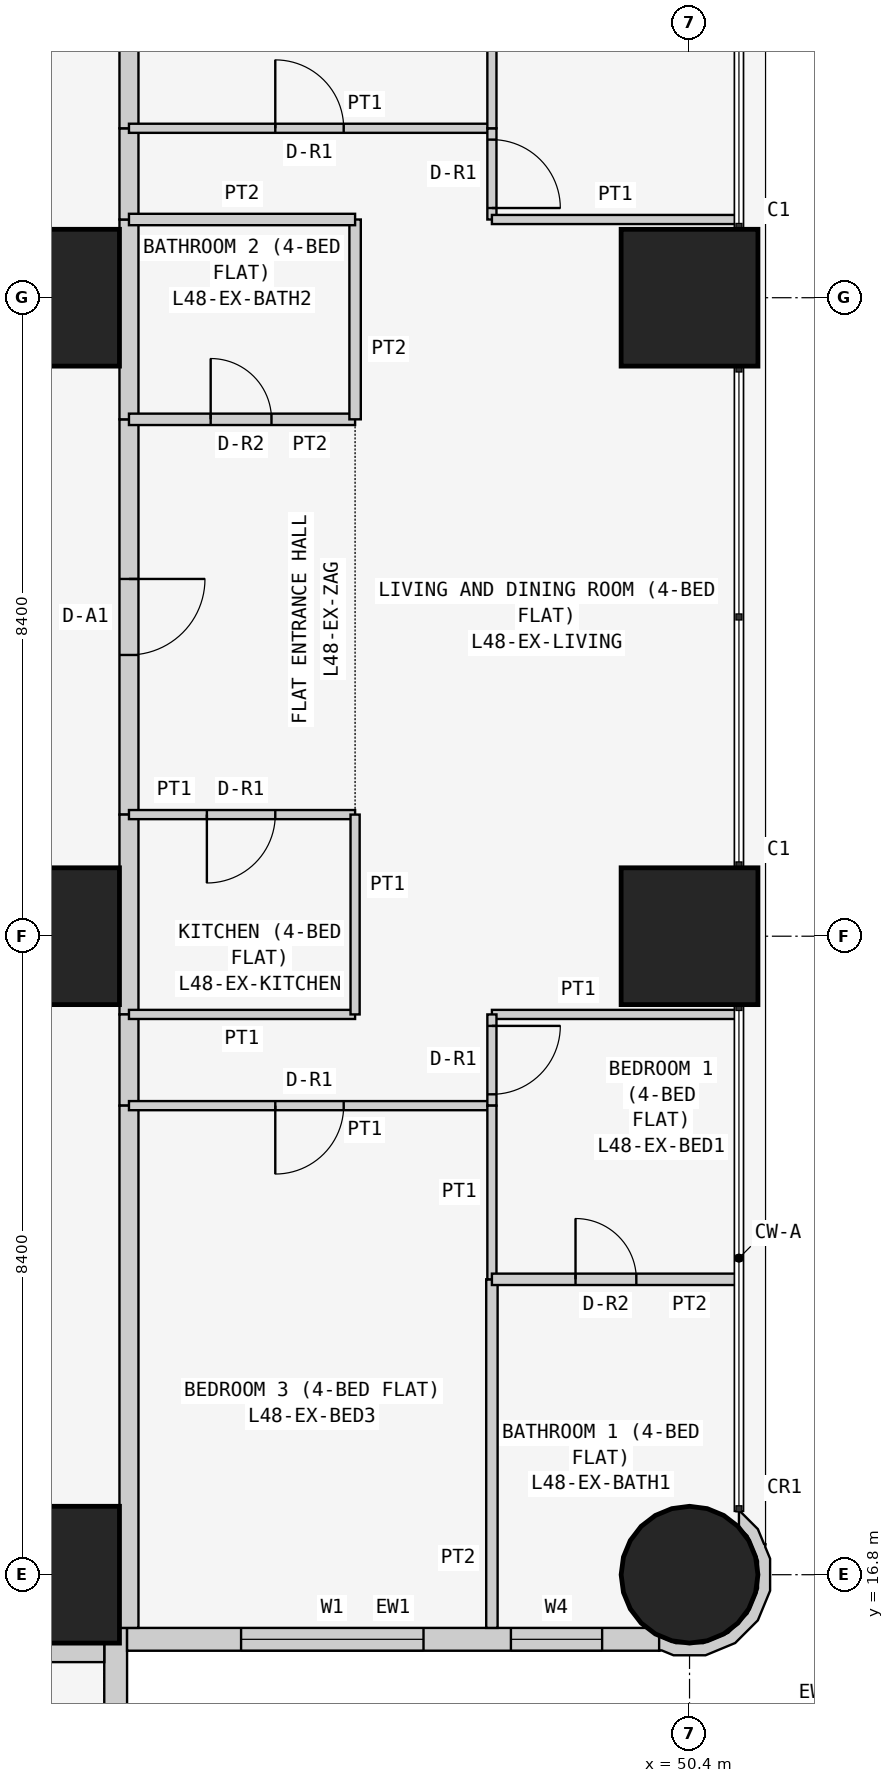
"""IFC4 building model, lengths in metres.
Left out: names, types, materials, properties, quantities, classifications, styles, units other than length and angle.
Written with IfcOpenShell. Run it as: python <this file> out.ifc"""

import sys

from ifc_helpers import new_model, si_unit, direction, frame, frame_2d, origin, origin_2d, place, context, subcontext, project, spatial, polyline, rectangle, circle, outline, extrude, element, fill, save


model = new_model("IFC4")
c1 = context("Model", 3, precision=1e-05, world=origin(), true_north=direction((0.0, 1.0)))
c2 = subcontext(c1, "Body", "Model", "MODEL_VIEW")
j1 = project(units=[si_unit("LENGTHUNIT", "METRE"), si_unit("PLANEANGLEUNIT", "RADIAN")], contexts=[c1])
p1 = place(None, origin())
s1 = spatial("IfcSite", under=j1, at=p1, CompositionType="ELEMENT")
p2 = place(p1, origin())
s2 = spatial("IfcBuilding", under=s1, at=p2, CompositionType="ELEMENT")
p3 = place(p2, frame((0.0, 0.0, 186.9)))
s3 = spatial("IfcBuildingStorey", under=s2, at=p3, CompositionType="ELEMENT", Elevation=186.9)
for number, where, z_axis, x_axis in (
    (1, (42.0, 16.8, 0.0), (0.0, 0.0, 1.0), (1.0, 0.0, 0.0)),
    (2, (42.0, 25.2, 0.0), (0.0, 0.0, 1.0), (1.0, 0.0, 0.0)),
    (3, (42.0, 33.6, 0.0), (0.0, 0.0, 1.0), (1.0, 0.0, 0.0)),
):
    element("IfcColumn", number, at=place(p3, frame(where, z_axis=z_axis, x_axis=x_axis)), inside=s3, PredefinedType="COLUMN", context=c2, shape_type="SweptSolid", body=[
        extrude(rectangle(XDim=1.8, YDim=1.8, at=origin_2d()), origin(), (0.0, 0.0, 1.0), 3.6),
    ])
p4 = place(p3, frame((50.4, 16.8, 0.0), z_axis=(0.0, 0.0, 1.0), x_axis=(1.0, 0.0, 0.0)))
e4 = element("IfcColumn", 4, at=p4, inside=s3, PredefinedType="COLUMN", context=c2, shape_type="SweptSolid", body=[
    extrude(circle(Radius=0.9, at=origin_2d()), origin(), (0.0, 0.0, 1.0), 3.6),
])
for number, where, z_axis, x_axis in (
    (5, (50.4, 25.2, 0.0), (0.0, 0.0, 1.0), (1.0, 0.0, 0.0)),
    (6, (50.4, 33.6, 0.0), (0.0, 0.0, 1.0), (1.0, 0.0, 0.0)),
):
    element("IfcColumn", number, at=place(p3, frame(where, z_axis=z_axis, x_axis=x_axis)), inside=s3, PredefinedType="COLUMN", context=c2, shape_type="SweptSolid", body=[
        extrude(rectangle(XDim=1.8, YDim=1.8, at=origin_2d()), origin(), (0.0, 0.0, 1.0), 3.6),
    ])
p5 = place(p3, frame((42.85, 8.8, 0.0), z_axis=(0.0, 0.0, 1.0), x_axis=(0.0, 1.0, 0.0)))
e7 = element("IfcWall", 7, at=p5, inside=s3, PredefinedType="SOLIDWALL", context=c2, shape_type="SweptSolid", body=[
    extrude(rectangle(XDim=7.3, YDim=0.3, at=frame_2d((3.65, 0.0))), origin(), (0.0, 0.0, 1.0), 3.45),
])
p6 = place(p5, frame((3.1, 0.0, 0.9)))
e8 = element("IfcOpeningElement", 8, at=p6, cuts=e7, PredefinedType="OPENING", context=c2, shape_type="SweptSolid", body=[
    extrude(rectangle(XDim=2.4, YDim=1.5, at=frame_2d((1.2, 0.75))), frame((0.0, 0.16, 0.0), z_axis=(0.0, -1.0, 0.0), x_axis=(1.0, 0.0, 0.0)), (0.0, 0.0, 1.0), 0.32),
])
p7 = place(p5, frame((0.75, 0.0, 0.9)))
e9 = element("IfcOpeningElement", 9, at=p7, cuts=e7, PredefinedType="OPENING", context=c2, shape_type="SweptSolid", body=[
    extrude(rectangle(XDim=1.2, YDim=1.5, at=frame_2d((0.6, 0.75))), frame((0.0, 0.16, 0.0), z_axis=(0.0, -1.0, 0.0), x_axis=(1.0, 0.0, 0.0)), (0.0, 0.0, 1.0), 0.32),
])
p8 = place(p3, frame((43.0, 15.95, 0.0), z_axis=(0.0, 0.0, 1.0), x_axis=(1.0, 0.0, 0.0)))
e10 = element("IfcWall", 10, at=p8, inside=s3, PredefinedType="SOLIDWALL", context=c2, shape_type="SweptSolid", body=[
    extrude(rectangle(XDim=7.0, YDim=0.3, at=frame_2d((3.5, 0.0))), origin(), (0.0, 0.0, 1.0), 3.45),
])
p9 = place(p8, frame((1.5, 0.0, 0.9)))
e11 = element("IfcOpeningElement", 11, at=p9, cuts=e10, PredefinedType="OPENING", context=c2, shape_type="SweptSolid", body=[
    extrude(rectangle(XDim=2.4, YDim=1.5, at=frame_2d((1.2, 0.75))), frame((0.0, 0.16, 0.0), z_axis=(0.0, -1.0, 0.0), x_axis=(1.0, 0.0, 0.0)), (0.0, 0.0, 1.0), 0.32),
])
p10 = place(p8, frame((5.05, 0.0, 0.9)))
e12 = element("IfcOpeningElement", 12, at=p10, cuts=e10, PredefinedType="OPENING", context=c2, shape_type="SweptSolid", body=[
    extrude(rectangle(XDim=1.2, YDim=1.5, at=frame_2d((0.6, 0.75))), frame((0.0, 0.16, 0.0), z_axis=(0.0, -1.0, 0.0), x_axis=(1.0, 0.0, 0.0)), (0.0, 0.0, 1.0), 0.32),
])
p11 = place(p3, frame((50.036, 15.89, 0.0), z_axis=(0.0, 0.0, 1.0), x_axis=(0.926129809145, -0.377204953059, 0.0)))
e13 = element("IfcWall", 13, at=p11, inside=s3, PredefinedType="SOLIDWALL", context=c2, shape_type="SweptSolid", body=[
    extrude(outline(polyline([(0.769, 1.728), (0.75, 1.723), (0.6, 1.875), (0.295, 2.004), (0.281, 1.998), (0.36, 1.803), (0.509, 1.741), (0.761, 1.486), (0.896, 1.154), (0.894, 0.795), (0.755, 0.465), (0.5, 0.213), (0.168, 0.078), (-0.1, 0.08), (0.001, -0.097), (0.03, -0.08), (0.198, -0.081), (0.589, 0.078), (0.889, 0.374), (1.052, 0.763), (1.055, 1.184), (0.896, 1.575), (0.778, 1.695), (0.769, 1.728)])), origin(), (0.0, 0.0, 1.0), 3.45),
])
p12 = place(p3, frame((43.025, 32.0, 0.0), z_axis=(0.0, 0.0, 1.0), x_axis=(0.0, -1.0, 0.0)))
e14 = element("IfcWall", 14, at=p12, inside=s3, PredefinedType="PARTITIONING", context=c2, shape_type="SweptSolid", body=[
    extrude(rectangle(XDim=5.2, YDim=0.25, at=frame_2d((2.6, 0.0))), origin(), (0.0, 0.0, 1.0), 3.45),
])
p13 = place(p12, frame((2.1, 0.0, 0.0)))
e15 = element("IfcOpeningElement", 15, at=p13, cuts=e14, PredefinedType="OPENING", context=c2, shape_type="SweptSolid", body=[
    extrude(rectangle(XDim=1.0, YDim=2.1, at=frame_2d((0.5, 1.05))), frame((0.0, 0.135, 0.0), z_axis=(0.0, -1.0, 0.0), x_axis=(1.0, 0.0, 0.0)), (0.0, 0.0, 1.0), 0.27),
])
p14 = place(p3, frame((43.025, 34.629, 0.0), z_axis=(0.0, 0.0, 1.0), x_axis=(0.0, -1.0, 0.0)))
e16 = element("IfcWall", 16, at=p14, inside=s3, PredefinedType="PARTITIONING", context=c2, shape_type="SweptSolid", body=[
    extrude(rectangle(XDim=2.629, YDim=0.25, at=frame_2d((1.314, 0.0))), origin(), (0.0, 0.0, 1.0), 3.45),
])
p15 = place(p3, frame((43.025, 26.8, 0.0), z_axis=(0.0, 0.0, 1.0), x_axis=(0.0, -1.0, 0.0)))
e17 = element("IfcWall", 17, at=p15, inside=s3, PredefinedType="PARTITIONING", context=c2, shape_type="SweptSolid", body=[
    extrude(rectangle(XDim=2.629, YDim=0.25, at=frame_2d((1.314, 0.0))), origin(), (0.0, 0.0, 1.0), 3.45),
])
p16 = place(p3, frame((43.025, 24.171, 0.0), z_axis=(0.0, 0.0, 1.0), x_axis=(0.0, -1.0, 0.0)))
e18 = element("IfcWall", 18, at=p16, inside=s3, PredefinedType="PARTITIONING", context=c2, shape_type="SweptSolid", body=[
    extrude(rectangle(XDim=1.2, YDim=0.25, at=frame_2d((0.6, 0.0))), origin(), (0.0, 0.0, 1.0), 3.45),
])
p17 = place(p3, frame((43.025, 35.829, 0.0), z_axis=(0.0, 0.0, 1.0), x_axis=(0.0, -1.0, 0.0)))
e19 = element("IfcWall", 19, at=p17, inside=s3, PredefinedType="PARTITIONING", context=c2, shape_type="SweptSolid", body=[
    extrude(rectangle(XDim=1.2, YDim=0.25, at=frame_2d((0.6, 0.0))), origin(), (0.0, 0.0, 1.0), 3.45),
])
for number, where, z_axis, x_axis in (
    (20, (43.025, 42.7, 0.0), (0.0, 0.0, 1.0), (0.0, -1.0, 0.0)),
    (21, (43.025, 22.971, 0.0), (0.0, 0.0, 1.0), (0.0, -1.0, 0.0)),
    (22, (42.7, 15.775, 0.0), (0.0, 0.0, 1.0), (-1.0, 0.0, 0.0)),
):
    element("IfcWall", number, at=place(p3, frame(where, z_axis=z_axis, x_axis=x_axis)), inside=s3, PredefinedType="PARTITIONING", context=c2, shape_type="SweptSolid", body=[
        extrude(rectangle(XDim=6.871, YDim=0.25, at=frame_2d((3.436, 0.0))), origin(), (0.0, 0.0, 1.0), 3.45),
    ])
p18 = place(p3, frame((46.0, 32.0, 0.0), z_axis=(0.0, 0.0, 1.0), x_axis=(-1.0, 0.0, 0.0)))
e23 = element("IfcWall", 23, at=p18, inside=s3, PredefinedType="PARTITIONING", context=c2, shape_type="SweptSolid", body=[
    extrude(rectangle(XDim=2.975, YDim=0.15, at=frame_2d((1.488, 0.0))), origin(), (0.0, 0.0, 1.0), 3.45),
])
p19 = place(p18, frame((1.1, 0.0, 0.0)))
e24 = element("IfcOpeningElement", 24, at=p19, cuts=e23, PredefinedType="OPENING", context=c2, shape_type="SweptSolid", body=[
    extrude(rectangle(XDim=0.8, YDim=2.1, at=frame_2d((0.4, 1.05))), frame((0.0, 0.085, 0.0), z_axis=(0.0, -1.0, 0.0), x_axis=(1.0, 0.0, 0.0)), (0.0, 0.0, 1.0), 0.17),
])
p20 = place(p3, frame((43.025, 26.8, 0.0), z_axis=(0.0, 0.0, 1.0), x_axis=(1.0, 0.0, 0.0)))
e25 = element("IfcWall", 25, at=p20, inside=s3, PredefinedType="PARTITIONING", context=c2, shape_type="SweptSolid", body=[
    extrude(rectangle(XDim=2.975, YDim=0.12, at=frame_2d((1.488, 0.0))), origin(), (0.0, 0.0, 1.0), 3.45),
])
p21 = place(p20, frame((1.025, 0.0, 0.0)))
e26 = element("IfcOpeningElement", 26, at=p21, cuts=e25, PredefinedType="OPENING", context=c2, shape_type="SweptSolid", body=[
    extrude(rectangle(XDim=0.9, YDim=2.1, at=frame_2d((0.45, 1.05))), frame((0.0, 0.07, 0.0), z_axis=(0.0, -1.0, 0.0), x_axis=(1.0, 0.0, 0.0)), (0.0, 0.0, 1.0), 0.14),
])
p22 = place(p3, frame((46.0, 32.0, 0.0), z_axis=(0.0, 0.0, 1.0), x_axis=(0.0, 1.0, 0.0)))
e27 = element("IfcWall", 27, at=p22, inside=s3, PredefinedType="PARTITIONING", context=c2, shape_type="SweptSolid", body=[
    extrude(rectangle(XDim=2.629, YDim=0.15, at=frame_2d((1.314, 0.0))), origin(), (0.0, 0.0, 1.0), 3.45),
])
p23 = place(p3, frame((46.0, 34.629, 0.0), z_axis=(0.0, 0.0, 1.0), x_axis=(-1.0, 0.0, 0.0)))
e28 = element("IfcWall", 28, at=p23, inside=s3, PredefinedType="PARTITIONING", context=c2, shape_type="SweptSolid", body=[
    extrude(rectangle(XDim=2.975, YDim=0.15, at=frame_2d((1.488, 0.0))), origin(), (0.0, 0.0, 1.0), 3.45),
])
p24 = place(p3, frame((43.025, 24.171, 0.0), z_axis=(0.0, 0.0, 1.0), x_axis=(1.0, 0.0, 0.0)))
e29 = element("IfcWall", 29, at=p24, inside=s3, PredefinedType="PARTITIONING", context=c2, shape_type="SweptSolid", body=[
    extrude(rectangle(XDim=2.975, YDim=0.12, at=frame_2d((1.488, 0.0))), origin(), (0.0, 0.0, 1.0), 3.45),
])
p25 = place(p3, frame((46.0, 24.171, 0.0), z_axis=(0.0, 0.0, 1.0), x_axis=(0.0, 1.0, 0.0)))
e30 = element("IfcWall", 30, at=p25, inside=s3, PredefinedType="PARTITIONING", context=c2, shape_type="SweptSolid", body=[
    extrude(rectangle(XDim=2.629, YDim=0.12, at=frame_2d((1.314, 0.0))), origin(), (0.0, 0.0, 1.0), 3.45),
])
p26 = place(p3, frame((43.025, 35.829, 0.0), z_axis=(0.0, 0.0, 1.0), x_axis=(1.0, 0.0, 0.0)))
e31 = element("IfcWall", 31, at=p26, inside=s3, PredefinedType="PARTITIONING", context=c2, shape_type="SweptSolid", body=[
    extrude(rectangle(XDim=4.775, YDim=0.12, at=frame_2d((2.388, 0.0))), origin(), (0.0, 0.0, 1.0), 3.45),
])
p27 = place(p26, frame((1.925, 0.0, 0.0)))
e32 = element("IfcOpeningElement", 32, at=p27, cuts=e31, PredefinedType="OPENING", context=c2, shape_type="SweptSolid", body=[
    extrude(rectangle(XDim=0.9, YDim=2.1, at=frame_2d((0.45, 1.05))), frame((0.0, 0.07, 0.0), z_axis=(0.0, -1.0, 0.0), x_axis=(1.0, 0.0, 0.0)), (0.0, 0.0, 1.0), 0.14),
])
p28 = place(p3, frame((47.8, 35.829, 0.0), z_axis=(0.0, 0.0, 1.0), x_axis=(0.0, -1.0, 0.0)))
e33 = element("IfcWall", 33, at=p28, inside=s3, PredefinedType="PARTITIONING", context=c2, shape_type="SweptSolid", body=[
    extrude(rectangle(XDim=1.2, YDim=0.12, at=frame_2d((0.6, 0.0))), origin(), (0.0, 0.0, 1.0), 3.45),
])
p29 = place(p28, frame((0.149, 0.0, 0.0)))
e34 = element("IfcOpeningElement", 34, at=p29, cuts=e33, PredefinedType="OPENING", context=c2, shape_type="SweptSolid", body=[
    extrude(rectangle(XDim=0.9, YDim=2.1, at=frame_2d((0.45, 1.05))), frame((0.0, 0.07, 0.0), z_axis=(0.0, -1.0, 0.0), x_axis=(1.0, 0.0, 0.0)), (0.0, 0.0, 1.0), 0.14),
])
p30 = place(p3, frame((47.8, 34.629, 0.0), z_axis=(0.0, 0.0, 1.0), x_axis=(1.0, 0.0, 0.0)))
e35 = element("IfcWall", 35, at=p30, inside=s3, PredefinedType="PARTITIONING", context=c2, shape_type="SweptSolid", body=[
    extrude(rectangle(XDim=3.25, YDim=0.12, at=frame_2d((1.625, 0.0))), origin(), (0.0, 0.0, 1.0), 3.45),
])
p31 = place(p3, frame((47.8, 22.971, 0.0), z_axis=(0.0, 0.0, 1.0), x_axis=(-1.0, 0.0, 0.0)))
e36 = element("IfcWall", 36, at=p31, inside=s3, PredefinedType="PARTITIONING", context=c2, shape_type="SweptSolid", body=[
    extrude(rectangle(XDim=4.775, YDim=0.12, at=frame_2d((2.388, 0.0))), origin(), (0.0, 0.0, 1.0), 3.45),
])
p32 = place(p31, frame((1.95, 0.0, 0.0)))
e37 = element("IfcOpeningElement", 37, at=p32, cuts=e36, PredefinedType="OPENING", context=c2, shape_type="SweptSolid", body=[
    extrude(rectangle(XDim=0.9, YDim=2.1, at=frame_2d((0.45, 1.05))), frame((0.0, 0.07, 0.0), z_axis=(0.0, -1.0, 0.0), x_axis=(1.0, 0.0, 0.0)), (0.0, 0.0, 1.0), 0.14),
])
p33 = place(p3, frame((51.05, 24.171, 0.0), z_axis=(0.0, 0.0, 1.0), x_axis=(-1.0, 0.0, 0.0)))
e38 = element("IfcWall", 38, at=p33, inside=s3, PredefinedType="PARTITIONING", context=c2, shape_type="SweptSolid", body=[
    extrude(rectangle(XDim=3.25, YDim=0.12, at=frame_2d((1.625, 0.0))), origin(), (0.0, 0.0, 1.0), 3.45),
])
p34 = place(p3, frame((47.8, 24.171, 0.0), z_axis=(0.0, 0.0, 1.0), x_axis=(0.0, -1.0, 0.0)))
e39 = element("IfcWall", 39, at=p34, inside=s3, PredefinedType="PARTITIONING", context=c2, shape_type="SweptSolid", body=[
    extrude(rectangle(XDim=1.2, YDim=0.12, at=frame_2d((0.6, 0.0))), origin(), (0.0, 0.0, 1.0), 3.45),
])
p35 = place(p34, frame((0.151, 0.0, 0.0)))
e40 = element("IfcOpeningElement", 40, at=p35, cuts=e39, PredefinedType="OPENING", context=c2, shape_type="SweptSolid", body=[
    extrude(rectangle(XDim=0.9, YDim=2.1, at=frame_2d((0.45, 1.05))), frame((0.0, 0.07, 0.0), z_axis=(0.0, -1.0, 0.0), x_axis=(1.0, 0.0, 0.0)), (0.0, 0.0, 1.0), 0.14),
])
p36 = place(p3, frame((47.8, 35.829, 0.0), z_axis=(0.0, 0.0, 1.0), x_axis=(0.0, 1.0, 0.0)))
e41 = element("IfcWall", 41, at=p36, inside=s3, PredefinedType="PARTITIONING", context=c2, shape_type="SweptSolid", body=[
    extrude(rectangle(XDim=6.871, YDim=0.12, at=frame_2d((3.436, 0.0))), origin(), (0.0, 0.0, 1.0), 3.45),
])
p37 = place(p3, frame((47.8, 16.1, 0.0), z_axis=(0.0, 0.0, 1.0), x_axis=(0.0, 1.0, 0.0)))
e42 = element("IfcWall", 42, at=p37, inside=s3, PredefinedType="PARTITIONING", context=c2, shape_type="SweptSolid", body=[
    extrude(rectangle(XDim=4.586, YDim=0.15, at=frame_2d((2.293, 0.0))), origin(), (0.0, 0.0, 1.0), 3.45),
])
p38 = place(p3, frame((47.8, 20.686, 0.0), z_axis=(0.0, 0.0, 1.0), x_axis=(0.0, 1.0, 0.0)))
e43 = element("IfcWall", 43, at=p38, inside=s3, PredefinedType="PARTITIONING", context=c2, shape_type="SweptSolid", body=[
    extrude(rectangle(XDim=2.285, YDim=0.12, at=frame_2d((1.143, 0.0))), origin(), (0.0, 0.0, 1.0), 3.45),
])
p39 = place(p3, frame((51.05, 20.686, 0.0), z_axis=(0.0, 0.0, 1.0), x_axis=(-1.0, 0.0, 0.0)))
e44 = element("IfcWall", 44, at=p39, inside=s3, PredefinedType="PARTITIONING", context=c2, shape_type="SweptSolid", body=[
    extrude(rectangle(XDim=3.25, YDim=0.15, at=frame_2d((1.625, 0.0))), origin(), (0.0, 0.0, 1.0), 3.45),
])
p40 = place(p39, frame((1.35, 0.0, 0.0)))
e45 = element("IfcOpeningElement", 45, at=p40, cuts=e44, PredefinedType="OPENING", context=c2, shape_type="SweptSolid", body=[
    extrude(rectangle(XDim=0.8, YDim=2.1, at=frame_2d((0.4, 1.05))), frame((0.0, 0.085, 0.0), z_axis=(0.0, -1.0, 0.0), x_axis=(1.0, 0.0, 0.0)), (0.0, 0.0, 1.0), 0.17),
])
p41 = place(p9, origin())
e46 = element("IfcWindow", 46, at=p41, inside=s3, PartitioningType="SINGLE_PANEL", PredefinedType="WINDOW", context=c2, shape_type="SweptSolid", body=[
    extrude(rectangle(XDim=2.4, YDim=1.5, at=frame_2d((1.2, 0.75))), frame((0.0, 0.03, 0.0), z_axis=(0.0, -1.0, 0.0), x_axis=(1.0, 0.0, 0.0)), (0.0, 0.0, 1.0), 0.06),
])
fill(e11, e46)
p42 = place(p10, origin())
e47 = element("IfcWindow", 47, at=p42, inside=s3, PartitioningType="SINGLE_PANEL", PredefinedType="WINDOW", context=c2, shape_type="SweptSolid", body=[
    extrude(rectangle(XDim=1.2, YDim=1.5, at=frame_2d((0.6, 0.75))), frame((0.0, 0.03, 0.0), z_axis=(0.0, -1.0, 0.0), x_axis=(1.0, 0.0, 0.0)), (0.0, 0.0, 1.0), 0.06),
])
fill(e12, e47)
p43 = place(p13, origin())
e48 = element("IfcDoor", 48, at=p43, inside=s3, OperationType="SINGLE_SWING_LEFT", PredefinedType="DOOR", context=c2, shape_type="SweptSolid", body=[
    extrude(rectangle(XDim=1.0, YDim=2.1, at=frame_2d((0.5, 1.05))), frame((0.0, 0.025, 0.0), z_axis=(0.0, -1.0, 0.0), x_axis=(1.0, 0.0, 0.0)), (0.0, 0.0, 1.0), 0.05),
])
fill(e15, e48)
p44 = place(p19, frame((0.8, 0.0, 0.0), z_axis=(0.0, 0.0, 1.0), x_axis=(-1.0, 0.0, 0.0)))
e49 = element("IfcDoor", 49, at=p44, inside=s3, OperationType="SINGLE_SWING_LEFT", PredefinedType="DOOR", context=c2, shape_type="SweptSolid", body=[
    extrude(rectangle(XDim=0.8, YDim=2.1, at=frame_2d((0.4, 1.05))), frame((0.0, 0.025, 0.0), z_axis=(0.0, -1.0, 0.0), x_axis=(1.0, 0.0, 0.0)), (0.0, 0.0, 1.0), 0.05),
])
fill(e24, e49)
p45 = place(p21, frame((0.9, 0.0, 0.0), z_axis=(0.0, 0.0, 1.0), x_axis=(-1.0, 0.0, 0.0)))
e50 = element("IfcDoor", 50, at=p45, inside=s3, OperationType="SINGLE_SWING_RIGHT", PredefinedType="DOOR", context=c2, shape_type="SweptSolid", body=[
    extrude(rectangle(XDim=0.9, YDim=2.1, at=frame_2d((0.45, 1.05))), frame((0.0, 0.025, 0.0), z_axis=(0.0, -1.0, 0.0), x_axis=(1.0, 0.0, 0.0)), (0.0, 0.0, 1.0), 0.05),
])
fill(e26, e50)
p46 = place(p27, origin())
e51 = element("IfcDoor", 51, at=p46, inside=s3, OperationType="SINGLE_SWING_LEFT", PredefinedType="DOOR", context=c2, shape_type="SweptSolid", body=[
    extrude(rectangle(XDim=0.9, YDim=2.1, at=frame_2d((0.45, 1.05))), frame((0.0, 0.025, 0.0), z_axis=(0.0, -1.0, 0.0), x_axis=(1.0, 0.0, 0.0)), (0.0, 0.0, 1.0), 0.05),
])
fill(e32, e51)
p47 = place(p29, origin())
e52 = element("IfcDoor", 52, at=p47, inside=s3, OperationType="SINGLE_SWING_RIGHT", PredefinedType="DOOR", context=c2, shape_type="SweptSolid", body=[
    extrude(rectangle(XDim=0.9, YDim=2.1, at=frame_2d((0.45, 1.05))), frame((0.0, 0.025, 0.0), z_axis=(0.0, -1.0, 0.0), x_axis=(1.0, 0.0, 0.0)), (0.0, 0.0, 1.0), 0.05),
])
fill(e34, e52)
p48 = place(p32, origin())
e53 = element("IfcDoor", 53, at=p48, inside=s3, OperationType="SINGLE_SWING_RIGHT", PredefinedType="DOOR", context=c2, shape_type="SweptSolid", body=[
    extrude(rectangle(XDim=0.9, YDim=2.1, at=frame_2d((0.45, 1.05))), frame((0.0, 0.025, 0.0), z_axis=(0.0, -1.0, 0.0), x_axis=(1.0, 0.0, 0.0)), (0.0, 0.0, 1.0), 0.05),
])
fill(e37, e53)
p49 = place(p35, origin())
e54 = element("IfcDoor", 54, at=p49, inside=s3, OperationType="SINGLE_SWING_LEFT", PredefinedType="DOOR", context=c2, shape_type="SweptSolid", body=[
    extrude(rectangle(XDim=0.9, YDim=2.1, at=frame_2d((0.45, 1.05))), frame((0.0, 0.025, 0.0), z_axis=(0.0, -1.0, 0.0), x_axis=(1.0, 0.0, 0.0)), (0.0, 0.0, 1.0), 0.05),
])
fill(e40, e54)
p50 = place(p40, frame((0.8, 0.0, 0.0), z_axis=(0.0, 0.0, 1.0), x_axis=(-1.0, 0.0, 0.0)))
e55 = element("IfcDoor", 55, at=p50, inside=s3, OperationType="SINGLE_SWING_LEFT", PredefinedType="DOOR", context=c2, shape_type="SweptSolid", body=[
    extrude(rectangle(XDim=0.8, YDim=2.1, at=frame_2d((0.4, 1.05))), frame((0.0, 0.025, 0.0), z_axis=(0.0, -1.0, 0.0), x_axis=(1.0, 0.0, 0.0)), (0.0, 0.0, 1.0), 0.05),
])
fill(e45, e55)
save(model, sys.argv[1])
